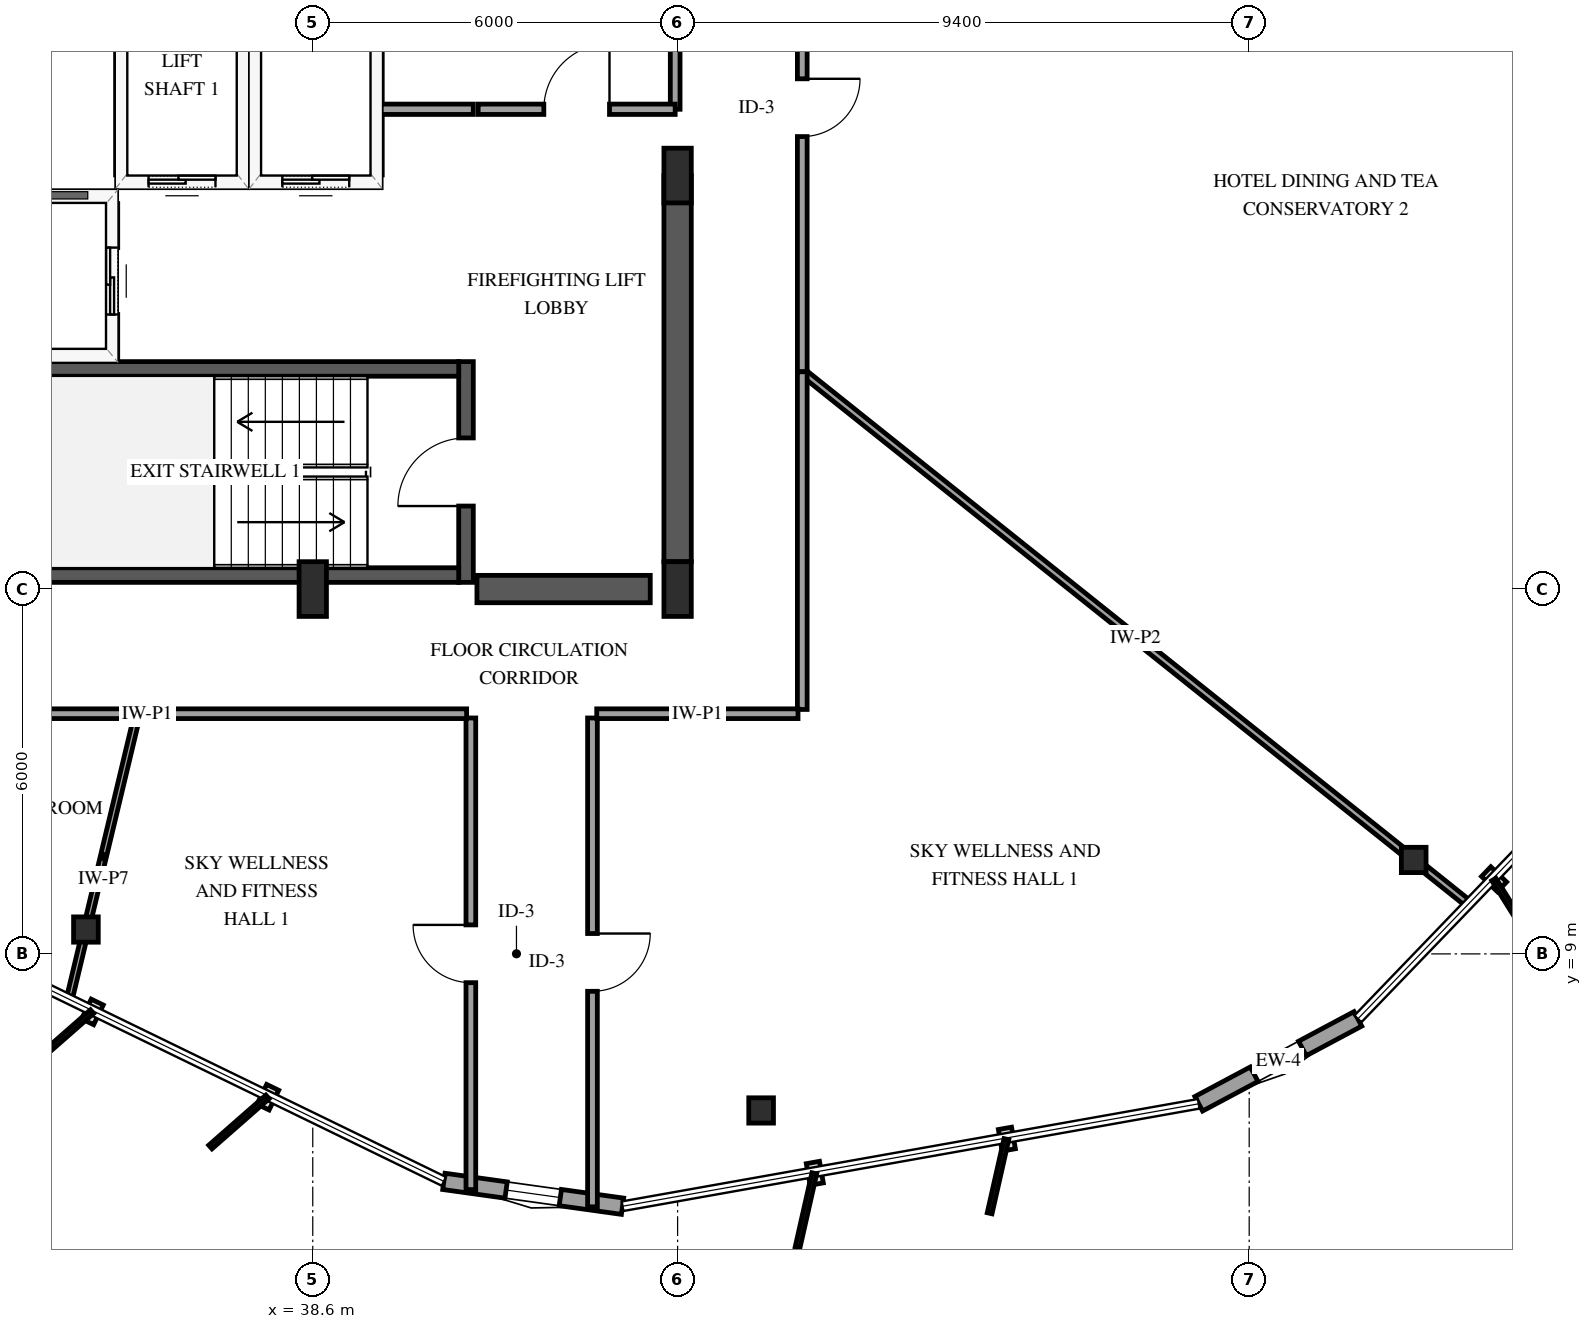
"""IFC4 building model, lengths in metres.
Left out: names, types, materials, properties, quantities, classifications, styles, units other than length and angle.
Written with IfcOpenShell. Run it as: python <this file> out.ifc"""

import sys

from ifc_helpers import new_model, si_unit, direction, frame, frame_2d, origin, origin_2d, place, context, subcontext, project, spatial, rectangle, i_section, extrude, element, fill, save


model = new_model("IFC4")
c1 = context("Model", 3, precision=1e-05, world=origin(), true_north=direction((0.0, 1.0)))
c2 = subcontext(c1, "Body", "Model", "MODEL_VIEW")
j1 = project(units=[si_unit("LENGTHUNIT", "METRE"), si_unit("PLANEANGLEUNIT", "RADIAN")], contexts=[c1])
p1 = place(None, origin())
s1 = spatial("IfcSite", under=j1, at=p1, CompositionType="ELEMENT")
p2 = place(p1, origin())
s2 = spatial("IfcBuilding", under=s1, at=p2, CompositionType="ELEMENT")
p3 = place(p2, frame((0.0, 0.0, 205.0)))
s3 = spatial("IfcBuildingStorey", under=s2, at=p3, CompositionType="ELEMENT", Elevation=205.0)
p4 = place(p3, frame((41.12, 15.11, 0.0), z_axis=(0.0, 0.0, 1.0), x_axis=(0.0, 1.0, 0.0)))
e1 = element("IfcWall", 1, at=p4, inside=s3, PredefinedType="SHEAR", context=c2, shape_type="SweptSolid", body=[
    extrude(rectangle(XDim=3.63, YDim=0.24, at=frame_2d((1.815, 0.0))), origin(), (0.0, 0.0, 1.0), 3.6),
])
p5 = place(p4, frame((1.255, 0.0, 0.0)))
e2 = element("IfcOpeningElement", 2, at=p5, cuts=e1, PredefinedType="OPENING", context=c2, shape_type="SweptSolid", body=[
    extrude(rectangle(XDim=1.12, YDim=2.15, at=frame_2d((0.56, 1.075))), frame((0.0, 0.13, 0.0), z_axis=(0.0, -1.0, 0.0), x_axis=(1.0, 0.0, 0.0)), (0.0, 0.0, 1.0), 0.26),
])
for number, where, z_axis, x_axis in (
    (3, (33.0, 15.23, 0.0), (0.0, 0.0, 1.0), (1.0, 0.0, 0.0)),
    (4, (33.0, 18.62, 0.0), (0.0, 0.0, 1.0), (1.0, 0.0, 0.0)),
):
    element("IfcWall", number, at=place(p3, frame(where, z_axis=z_axis, x_axis=x_axis)), inside=s3, PredefinedType="SHEAR", context=c2, shape_type="SweptSolid", body=[
        extrude(rectangle(XDim=8.0, YDim=0.24, at=frame_2d((4.0, 0.0))), origin(), (0.0, 0.0, 1.0), 3.6),
    ])
p6 = place(p3, frame((41.3, 15.0, 0.0), z_axis=(0.0, 0.0, 1.0), x_axis=(1.0, 0.0, 0.0)))
e5 = element("IfcWall", 5, at=p6, inside=s3, PredefinedType="SHEAR", context=c2, shape_type="SweptSolid", body=[
    extrude(rectangle(XDim=2.85, YDim=0.45, at=frame_2d((1.425, 0.0))), origin(), (0.0, 0.0, 1.0), 3.6),
])
p7 = place(p3, frame((44.6, 15.45, 0.0), z_axis=(0.0, 0.0, 1.0), x_axis=(0.0, 1.0, 0.0)))
e6 = element("IfcWall", 6, at=p7, inside=s3, PredefinedType="SHEAR", context=c2, shape_type="SweptSolid", body=[
    extrude(rectangle(XDim=6.35, YDim=0.45, at=frame_2d((3.175, 0.0))), origin(), (0.0, 0.0, 1.0), 3.6),
])
for number, where, z_axis, x_axis in (
    (7, (38.6, 15.0, 0.0), (0.0, 0.0, 1.0), (1.0, 0.0, 0.0)),
    (8, (44.6, 15.0, 0.0), (0.0, 0.0, 1.0), (1.0, 0.0, 0.0)),
    (9, (44.6, 21.8, 0.0), (0.0, 0.0, 1.0), (1.0, 0.0, 0.0)),
):
    element("IfcColumn", number, at=place(p3, frame(where, z_axis=z_axis, x_axis=x_axis)), inside=s3, PredefinedType="PILASTER", context=c2, shape_type="SweptSolid", body=[
        extrude(rectangle(XDim=0.45, YDim=0.9, at=origin_2d()), origin(), (0.0, 0.0, 1.0), 3.6),
    ])
for number, where, z_axis, x_axis in (
    (10, (34.87, 9.401, 0.0), (0.0, 0.0, 1.0), (1.0, 0.0, 0.0)),
    (11, (45.973, 6.426, 0.0), (0.0, 0.0, 1.0), (1.0, 0.0, 0.0)),
    (12, (56.705, 10.545, 0.0), (0.0, 0.0, 1.0), (1.0, 0.0, 0.0)),
):
    element("IfcColumn", number, at=place(p3, frame(where, z_axis=z_axis, x_axis=x_axis)), inside=s3, PredefinedType="COLUMN", context=c2, shape_type="SweptSolid", body=[
        extrude(i_section(OverallWidth=0.406, OverallDepth=0.416, WebThickness=0.03, FlangeThickness=0.048, FilletRadius=0.038, at=origin_2d()), origin(), (0.0, 0.0, 1.0), 3.6),
    ])
p8 = place(p3, frame((40.756, 5.259, 0.0), z_axis=(0.0, 0.0, 1.0), x_axis=(0.990464529439, -0.137767978586, 0.0)))
e13 = element("IfcWall", 13, at=p8, inside=s3, PredefinedType="SOLIDWALL", context=c2, shape_type="SweptSolid", body=[
    extrude(rectangle(XDim=2.967, YDim=0.27, at=frame_2d((1.483, 0.0))), origin(), (0.0, 0.0, 1.0), 2.679),
])
p9 = place(p8, frame((1.033, 0.0, 0.75)))
e14 = element("IfcOpeningElement", 14, at=p9, cuts=e13, PredefinedType="OPENING", context=c2, shape_type="SweptSolid", body=[
    extrude(rectangle(XDim=0.9, YDim=1.5, at=frame_2d((0.45, 0.75))), frame((0.0, 0.145, 0.0), z_axis=(0.0, -1.0, 0.0), x_axis=(1.0, 0.0, 0.0)), (0.0, 0.0, 1.0), 0.29),
])
p10 = place(p3, frame((53.17, 6.535, 0.0), z_axis=(0.0, 0.0, 1.0), x_axis=(0.882280032982, 0.470724912663, 0.0)))
e15 = element("IfcWall", 15, at=p10, inside=s3, PredefinedType="SOLIDWALL", context=c2, shape_type="SweptSolid", body=[
    extrude(rectangle(XDim=2.967, YDim=0.27, at=frame_2d((1.483, 0.0))), origin(), (0.0, 0.0, 1.0), 2.679),
])
p11 = place(p10, frame((1.033, 0.0, 0.75)))
e16 = element("IfcOpeningElement", 16, at=p11, cuts=e15, PredefinedType="OPENING", context=c2, shape_type="SweptSolid", body=[
    extrude(rectangle(XDim=0.9, YDim=1.5, at=frame_2d((0.45, 0.75))), frame((0.0, 0.145, 0.0), z_axis=(0.0, -1.0, 0.0), x_axis=(1.0, 0.0, 0.0)), (0.0, 0.0, 1.0), 0.29),
])
p12 = place(p3, frame((35.45, 21.7, 0.0), z_axis=(0.0, 0.0, 1.0), x_axis=(1.0, 0.0, 0.0)))
e17 = element("IfcWall", 17, at=p12, inside=s3, PredefinedType="SOLIDWALL", context=c2, shape_type="SweptSolid", body=[
    extrude(rectangle(XDim=2.0, YDim=0.185, at=frame_2d((1.0, 0.0))), origin(), (0.0, 0.0, 1.0), 3.3),
])
p13 = place(p12, frame((0.45, 0.0, 0.0)))
e18 = element("IfcOpeningElement", 18, at=p13, cuts=e17, PredefinedType="OPENING", context=c2, shape_type="SweptSolid", body=[
    extrude(rectangle(XDim=1.1, YDim=2.15, at=frame_2d((0.55, 1.075))), frame((0.0, 0.103, 0.0), z_axis=(0.0, -1.0, 0.0), x_axis=(1.0, 0.0, 0.0)), (0.0, 0.0, 1.0), 0.205),
])
for number, where, z_axis, x_axis in (
    (19, (35.45, 21.81, 0.0), (0.0, 0.0, 1.0), (0.0, 1.0, 0.0)),
    (20, (37.45, 21.81, 0.0), (0.0, 0.0, 1.0), (0.0, 1.0, 0.0)),
):
    element("IfcWall", number, at=place(p3, frame(where, z_axis=z_axis, x_axis=x_axis)), inside=s3, PredefinedType="SOLIDWALL", context=c2, shape_type="SweptSolid", body=[
        extrude(rectangle(XDim=2.38, YDim=0.185, at=frame_2d((1.19, 0.0))), origin(), (0.0, 0.0, 1.0), 3.3),
    ])
p14 = place(p3, frame((37.65, 21.7, 0.0), z_axis=(0.0, 0.0, 1.0), x_axis=(1.0, 0.0, 0.0)))
e21 = element("IfcWall", 21, at=p14, inside=s3, PredefinedType="SOLIDWALL", context=c2, shape_type="SweptSolid", body=[
    extrude(rectangle(XDim=2.0, YDim=0.185, at=frame_2d((1.0, 0.0))), origin(), (0.0, 0.0, 1.0), 3.3),
])
p15 = place(p14, frame((0.45, 0.0, 0.0)))
e22 = element("IfcOpeningElement", 22, at=p15, cuts=e21, PredefinedType="OPENING", context=c2, shape_type="SweptSolid", body=[
    extrude(rectangle(XDim=1.1, YDim=2.15, at=frame_2d((0.55, 1.075))), frame((0.0, 0.103, 0.0), z_axis=(0.0, -1.0, 0.0), x_axis=(1.0, 0.0, 0.0)), (0.0, 0.0, 1.0), 0.205),
])
p16 = place(p3, frame((39.65, 21.81, 0.0), z_axis=(0.0, 0.0, 1.0), x_axis=(0.0, 1.0, 0.0)))
e23 = element("IfcWall", 23, at=p16, inside=s3, PredefinedType="SOLIDWALL", context=c2, shape_type="SweptSolid", body=[
    extrude(rectangle(XDim=2.38, YDim=0.185, at=frame_2d((1.19, 0.0))), origin(), (0.0, 0.0, 1.0), 3.3),
])
p17 = place(p3, frame((32.72, 21.45, 0.0), z_axis=(0.0, 0.0, 1.0), x_axis=(1.0, 0.0, 0.0)))
e24 = element("IfcWall", 24, at=p17, inside=s3, PredefinedType="SOLIDWALL", context=c2, shape_type="SweptSolid", body=[
    extrude(rectangle(XDim=2.58, YDim=0.185, at=frame_2d((1.29, 0.0))), origin(), (0.0, 0.0, 1.0), 3.3),
])
p18 = place(p3, frame((35.3, 18.79, 0.0), z_axis=(0.0, 0.0, 1.0), x_axis=(0.0, 1.0, 0.0)))
e25 = element("IfcWall", 25, at=p18, inside=s3, PredefinedType="SOLIDWALL", context=c2, shape_type="SweptSolid", body=[
    extrude(rectangle(XDim=2.55, YDim=0.185, at=frame_2d((1.275, 0.0))), origin(), (0.0, 0.0, 1.0), 3.3),
])
p19 = place(p18, frame((0.725, 0.0, 0.0)))
e26 = element("IfcOpeningElement", 26, at=p19, cuts=e25, PredefinedType="OPENING", context=c2, shape_type="SweptSolid", body=[
    extrude(rectangle(XDim=1.1, YDim=2.15, at=frame_2d((0.55, 1.075))), frame((0.0, 0.103, 0.0), z_axis=(0.0, -1.0, 0.0), x_axis=(1.0, 0.0, 0.0)), (0.0, 0.0, 1.0), 0.205),
])
p20 = place(p3, frame((46.65, 18.573, 0.0), z_axis=(0.0, 0.0, 1.0), x_axis=(0.781466310876, -0.623947437663, 0.0)))
e27 = element("IfcWall", 27, at=p20, inside=s3, PredefinedType="PARTITIONING", context=c2, shape_type="SweptSolid", body=[
    extrude(rectangle(XDim=14.024, YDim=0.12, at=frame_2d((7.012, 0.0))), origin(), (0.0, 0.0, 1.0), 3.3),
])
p21 = place(p3, frame((46.65, 27.258, 0.0), z_axis=(0.0, 0.0, 1.0), x_axis=(0.0, -1.0, 0.0)))
e28 = element("IfcWall", 28, at=p21, inside=s3, PredefinedType="PARTITIONING", context=c2, shape_type="SweptSolid", body=[
    extrude(rectangle(XDim=8.685, YDim=0.16, at=frame_2d((4.343, 0.0))), origin(), (0.0, 0.0, 1.0), 3.3),
])
p22 = place(p21, frame((3.867, 0.0, 0.0)))
e29 = element("IfcOpeningElement", 29, at=p22, cuts=e28, PredefinedType="OPENING", context=c2, shape_type="SweptSolid", body=[
    extrude(rectangle(XDim=0.95, YDim=2.15, at=frame_2d((0.475, 1.075))), frame((0.0, 0.09, 0.0), z_axis=(0.0, -1.0, 0.0), x_axis=(1.0, 0.0, 0.0)), (0.0, 0.0, 1.0), 0.18),
])
p23 = place(p3, frame((43.2, 12.88, 0.0), z_axis=(0.0, 0.0, 1.0), x_axis=(0.0, -1.0, 0.0)))
e30 = element("IfcWall", 30, at=p23, inside=s3, PredefinedType="PARTITIONING", context=c2, shape_type="SweptSolid", body=[
    extrude(rectangle(XDim=8.039, YDim=0.16, at=frame_2d((4.02, 0.0))), origin(), (0.0, 0.0, 1.0), 2.678),
])
p24 = place(p23, frame((3.545, 0.0, 0.0)))
e31 = element("IfcOpeningElement", 31, at=p24, cuts=e30, PredefinedType="OPENING", context=c2, shape_type="SweptSolid", body=[
    extrude(rectangle(XDim=0.95, YDim=2.15, at=frame_2d((0.475, 1.075))), frame((0.0, 0.09, 0.0), z_axis=(0.0, -1.0, 0.0), x_axis=(1.0, 0.0, 0.0)), (0.0, 0.0, 1.0), 0.18),
])
p25 = place(p3, frame((41.2, 5.124, 0.0), z_axis=(0.0, 0.0, 1.0), x_axis=(0.0, 1.0, 0.0)))
e32 = element("IfcWall", 32, at=p25, inside=s3, PredefinedType="PARTITIONING", context=c2, shape_type="SweptSolid", body=[
    extrude(rectangle(XDim=7.756, YDim=0.16, at=frame_2d((3.878, 0.0))), origin(), (0.0, 0.0, 1.0), 3.3),
])
p26 = place(p25, frame((3.403, 0.0, 0.0)))
e33 = element("IfcOpeningElement", 33, at=p26, cuts=e32, PredefinedType="OPENING", context=c2, shape_type="SweptSolid", body=[
    extrude(rectangle(XDim=0.95, YDim=2.15, at=frame_2d((0.475, 1.075))), frame((0.0, 0.09, 0.0), z_axis=(0.0, -1.0, 0.0), x_axis=(1.0, 0.0, 0.0)), (0.0, 0.0, 1.0), 0.18),
])
p27 = place(p3, frame((44.56, 29.8, 0.0), z_axis=(0.0, 0.0, 1.0), x_axis=(0.0, -1.0, 0.0)))
e34 = element("IfcWall", 34, at=p27, inside=s3, PredefinedType="PARTITIONING", context=c2, shape_type="SweptSolid", body=[
    extrude(rectangle(XDim=6.91, YDim=0.16, at=frame_2d((3.455, 0.0))), origin(), (0.0, 0.0, 1.0), 2.34),
])
p28 = place(p27, frame((2.915, 0.0, 0.0)))
e35 = element("IfcOpeningElement", 35, at=p28, cuts=e34, PredefinedType="OPENING", context=c2, shape_type="SweptSolid", body=[
    extrude(rectangle(XDim=1.08, YDim=2.15, at=frame_2d((0.54, 1.075))), frame((0.0, 0.09, 0.0), z_axis=(0.0, -1.0, 0.0), x_axis=(1.0, 0.0, 0.0)), (0.0, 0.0, 1.0), 0.18),
])
p29 = place(p3, frame((46.65, 18.573, 0.0), z_axis=(0.0, 0.0, 1.0), x_axis=(0.0, -1.0, 0.0)))
e36 = element("IfcWall", 36, at=p29, inside=s3, PredefinedType="PARTITIONING", context=c2, shape_type="SweptSolid", body=[
    extrude(rectangle(XDim=5.553, YDim=0.16, at=frame_2d((2.776, 0.0))), origin(), (0.0, 0.0, 1.0), 3.3),
])
p30 = place(p3, frame((41.13, 12.95, 0.0), z_axis=(0.0, 0.0, 1.0), x_axis=(-1.0, 0.0, 0.0)))
e37 = element("IfcWall", 37, at=p30, inside=s3, PredefinedType="PARTITIONING", context=c2, shape_type="SweptSolid", body=[
    extrude(rectangle(XDim=5.411, YDim=0.16, at=frame_2d((2.706, 0.0))), origin(), (0.0, 0.0, 1.0), 3.3),
])
p31 = place(p3, frame((35.719, 12.95, 0.0), z_axis=(0.0, 0.0, 1.0), x_axis=(-1.0, 0.0, 0.0)))
e38 = element("IfcWall", 38, at=p31, inside=s3, PredefinedType="PARTITIONING", context=c2, shape_type="SweptSolid", body=[
    extrude(rectangle(XDim=5.099, YDim=0.16, at=frame_2d((2.549, 0.0))), origin(), (0.0, 0.0, 1.0), 3.3),
])
p32 = place(p3, frame((35.719, 12.95, 0.0), z_axis=(0.0, 0.0, 1.0), x_axis=(-0.232734329743, -0.972540349682, 0.0)))
e39 = element("IfcWall", 39, at=p32, inside=s3, PredefinedType="PARTITIONING", context=c2, shape_type="SweptSolid", body=[
    extrude(rectangle(XDim=4.83, YDim=0.1, at=frame_2d((2.415, 0.0))), origin(), (0.0, 0.0, 1.0), 2.595),
])
p33 = place(p3, frame((46.58, 12.95, 0.0), z_axis=(0.0, 0.0, 1.0), x_axis=(-1.0, 0.0, 0.0)))
e40 = element("IfcWall", 40, at=p33, inside=s3, PredefinedType="PARTITIONING", context=c2, shape_type="SweptSolid", body=[
    extrude(rectangle(XDim=3.31, YDim=0.16, at=frame_2d((1.655, 0.0))), origin(), (0.0, 0.0, 1.0), 3.3),
])
p34 = place(p3, frame((41.32, 22.89, 0.0), z_axis=(0.0, 0.0, 1.0), x_axis=(1.0, 0.0, 0.0)))
e41 = element("IfcWall", 41, at=p34, inside=s3, PredefinedType="PARTITIONING", context=c2, shape_type="SweptSolid", body=[
    extrude(rectangle(XDim=3.24, YDim=0.17, at=frame_2d((1.62, 0.0))), origin(), (0.0, 0.0, 1.0), 3.3),
])
p35 = place(p34, frame((1.08, 0.0, 0.0)))
e42 = element("IfcOpeningElement", 42, at=p35, cuts=e41, PredefinedType="OPENING", context=c2, shape_type="SweptSolid", body=[
    extrude(rectangle(XDim=1.08, YDim=2.15, at=frame_2d((0.54, 1.075))), frame((0.0, 0.095, 0.0), z_axis=(0.0, -1.0, 0.0), x_axis=(1.0, 0.0, 0.0)), (0.0, 0.0, 1.0), 0.19),
])
p36 = place(p3, frame((39.72, 22.89, 0.0), z_axis=(0.0, 0.0, 1.0), x_axis=(1.0, 0.0, 0.0)))
e43 = element("IfcWall", 43, at=p36, inside=s3, PredefinedType="PARTITIONING", context=c2, shape_type="SweptSolid", body=[
    extrude(rectangle(XDim=1.52, YDim=0.17, at=frame_2d((0.76, 0.0))), origin(), (0.0, 0.0, 1.0), 3.3),
])
p37 = place(p9, origin())
e44 = element("IfcWindow", 44, at=p37, inside=s3, PartitioningType="SINGLE_PANEL", PredefinedType="WINDOW", context=c2, shape_type="SweptSolid", body=[
    extrude(rectangle(XDim=0.9, YDim=1.5, at=frame_2d((0.45, 0.75))), frame((0.0, 0.03, 0.0), z_axis=(0.0, -1.0, 0.0), x_axis=(1.0, 0.0, 0.0)), (0.0, 0.0, 1.0), 0.06),
])
fill(e14, e44)
p38 = place(p11, origin())
e45 = element("IfcWindow", 45, at=p38, inside=s3, PartitioningType="SINGLE_PANEL", PredefinedType="WINDOW", context=c2, shape_type="SweptSolid", body=[
    extrude(rectangle(XDim=0.9, YDim=1.5, at=frame_2d((0.45, 0.75))), frame((0.0, 0.03, 0.0), z_axis=(0.0, -1.0, 0.0), x_axis=(1.0, 0.0, 0.0)), (0.0, 0.0, 1.0), 0.06),
])
fill(e16, e45)
p39 = place(p13, origin())
e46 = element("IfcDoor", 46, at=p39, inside=s3, OperationType="SLIDING_TO_LEFT", PredefinedType="DOOR", context=c2, shape_type="SweptSolid", body=[
    extrude(rectangle(XDim=1.1, YDim=2.15, at=frame_2d((0.55, 1.075))), frame((0.0, 0.025, 0.0), z_axis=(0.0, -1.0, 0.0), x_axis=(1.0, 0.0, 0.0)), (0.0, 0.0, 1.0), 0.05),
])
fill(e18, e46)
p40 = place(p15, origin())
e47 = element("IfcDoor", 47, at=p40, inside=s3, OperationType="SLIDING_TO_LEFT", PredefinedType="DOOR", context=c2, shape_type="SweptSolid", body=[
    extrude(rectangle(XDim=1.1, YDim=2.15, at=frame_2d((0.55, 1.075))), frame((0.0, 0.025, 0.0), z_axis=(0.0, -1.0, 0.0), x_axis=(1.0, 0.0, 0.0)), (0.0, 0.0, 1.0), 0.05),
])
fill(e22, e47)
p41 = place(p19, origin())
e48 = element("IfcDoor", 48, at=p41, inside=s3, OperationType="SLIDING_TO_LEFT", PredefinedType="DOOR", context=c2, shape_type="SweptSolid", body=[
    extrude(rectangle(XDim=1.1, YDim=2.15, at=frame_2d((0.55, 1.075))), frame((0.0, 0.025, 0.0), z_axis=(0.0, -1.0, 0.0), x_axis=(1.0, 0.0, 0.0)), (0.0, 0.0, 1.0), 0.05),
])
fill(e26, e48)
p42 = place(p5, origin())
e49 = element("IfcDoor", 49, at=p42, inside=s3, OperationType="SINGLE_SWING_LEFT", PredefinedType="DOOR", context=c2, shape_type="SweptSolid", body=[
    extrude(rectangle(XDim=1.12, YDim=2.15, at=frame_2d((0.56, 1.075))), frame((0.0, 0.025, 0.0), z_axis=(0.0, -1.0, 0.0), x_axis=(1.0, 0.0, 0.0)), (0.0, 0.0, 1.0), 0.05),
])
fill(e2, e49)
p43 = place(p22, origin())
e50 = element("IfcDoor", 50, at=p43, inside=s3, OperationType="SINGLE_SWING_LEFT", PredefinedType="DOOR", context=c2, shape_type="SweptSolid", body=[
    extrude(rectangle(XDim=0.95, YDim=2.15, at=frame_2d((0.475, 1.075))), frame((0.0, 0.025, 0.0), z_axis=(0.0, -1.0, 0.0), x_axis=(1.0, 0.0, 0.0)), (0.0, 0.0, 1.0), 0.05),
])
fill(e29, e50)
p44 = place(p24, origin())
e51 = element("IfcDoor", 51, at=p44, inside=s3, OperationType="SINGLE_SWING_LEFT", PredefinedType="DOOR", context=c2, shape_type="SweptSolid", body=[
    extrude(rectangle(XDim=0.95, YDim=2.15, at=frame_2d((0.475, 1.075))), frame((0.0, 0.025, 0.0), z_axis=(0.0, -1.0, 0.0), x_axis=(1.0, 0.0, 0.0)), (0.0, 0.0, 1.0), 0.05),
])
fill(e31, e51)
p45 = place(p26, origin())
e52 = element("IfcDoor", 52, at=p45, inside=s3, OperationType="SINGLE_SWING_RIGHT", PredefinedType="DOOR", context=c2, shape_type="SweptSolid", body=[
    extrude(rectangle(XDim=0.95, YDim=2.15, at=frame_2d((0.475, 1.075))), frame((0.0, 0.025, 0.0), z_axis=(0.0, -1.0, 0.0), x_axis=(1.0, 0.0, 0.0)), (0.0, 0.0, 1.0), 0.05),
])
fill(e33, e52)
p46 = place(p35, origin())
e53 = element("IfcDoor", 53, at=p46, inside=s3, OperationType="SINGLE_SWING_RIGHT", PredefinedType="DOOR", context=c2, shape_type="SweptSolid", body=[
    extrude(rectangle(XDim=1.08, YDim=2.15, at=frame_2d((0.54, 1.075))), frame((0.0, 0.025, 0.0), z_axis=(0.0, -1.0, 0.0), x_axis=(1.0, 0.0, 0.0)), (0.0, 0.0, 1.0), 0.05),
])
fill(e42, e53)
save(model, sys.argv[1])
